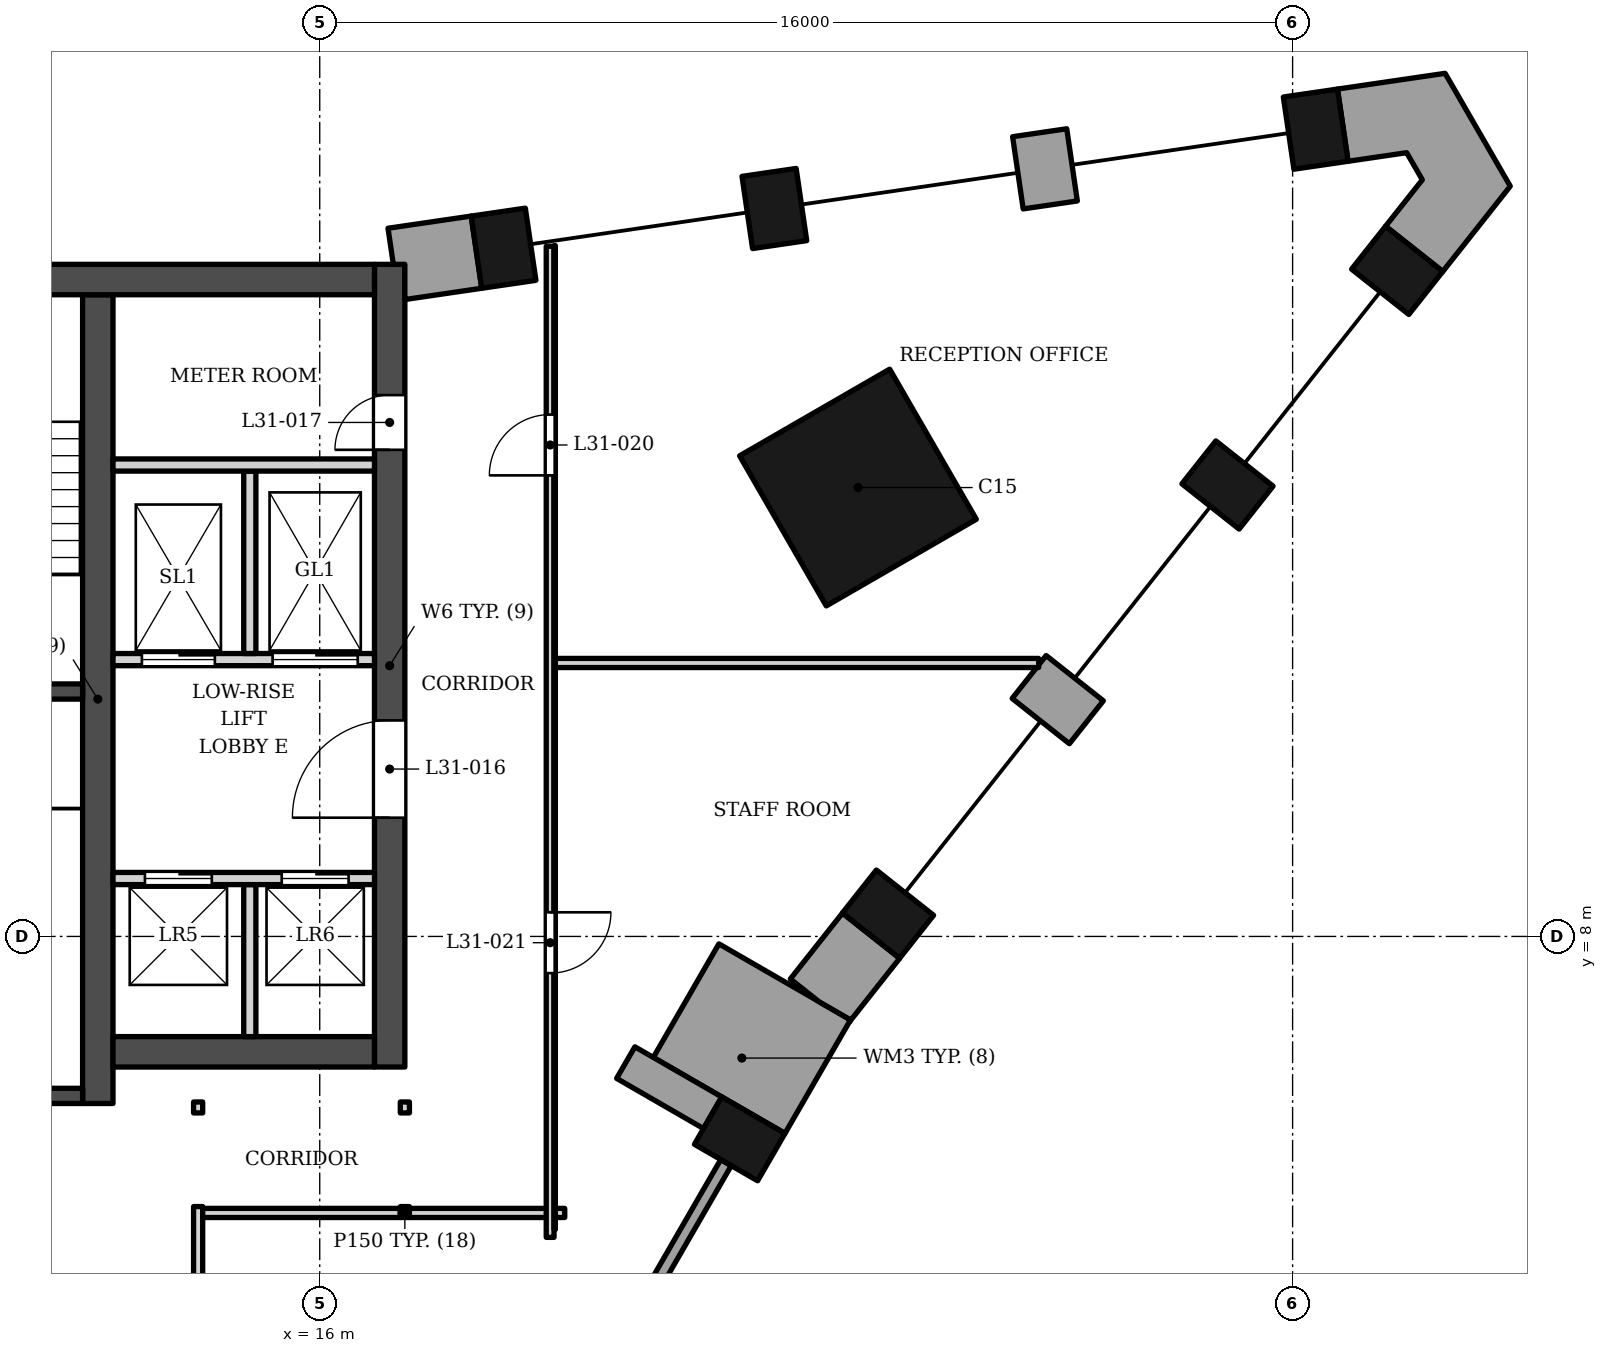
"""IFC4 building model, lengths in metres.
Left out: names, types, materials, properties, quantities, classifications, styles, units other than length and angle.
Written with IfcOpenShell. Run it as: python <this file> out.ifc"""

import sys

from ifc_helpers import new_model, si_unit, direction, frame, frame_2d, origin, origin_2d, place, context, subcontext, project, spatial, polyline, rectangle, outline, extrude, element, fill, save


model = new_model("IFC4")
c1 = context("Model", 3, precision=1e-05, world=origin(), true_north=direction((0.0, 1.0)))
c2 = subcontext(c1, "Body", "Model", "MODEL_VIEW")
j1 = project(units=[si_unit("LENGTHUNIT", "METRE"), si_unit("PLANEANGLEUNIT", "RADIAN")], contexts=[c1])
p1 = place(None, origin())
s1 = spatial("IfcSite", under=j1, at=p1, CompositionType="ELEMENT")
p2 = place(p1, origin())
s2 = spatial("IfcBuilding", under=s1, at=p2, CompositionType="ELEMENT")
p3 = place(p2, frame((0.0, 0.0, 132.6)))
s3 = spatial("IfcBuildingStorey", under=s2, at=p3, CompositionType="ELEMENT", Elevation=132.6)
p4 = place(p3, frame((-16.9, 18.802, 0.0), z_axis=(0.0, 0.0, 1.0), x_axis=(1.0, 0.0, 0.0)))
e1 = element("IfcWall", 1, at=p4, inside=s3, PredefinedType="SHEAR", context=c2, shape_type="SweptSolid", body=[
    extrude(rectangle(XDim=33.8, YDim=0.5, at=frame_2d((16.9, 0.0))), origin(), (0.0, 0.0, 1.0), 7.0),
])
p5 = place(p3, frame((12.35, 5.253, 0.0), z_axis=(0.0, 0.0, 1.0), x_axis=(0.0, 1.0, 0.0)))
e2 = element("IfcWall", 2, at=p5, inside=s3, PredefinedType="SHEAR", context=c2, shape_type="SweptSolid", body=[
    extrude(rectangle(XDim=13.3, YDim=0.5, at=frame_2d((6.65, 0.0))), origin(), (0.0, 0.0, 1.0), 7.0),
])
for number, where, z_axis, x_axis in (
    (3, (8.35, 12.028, 0.0), (0.0, 0.0, 1.0), (1.0, 0.0, 0.0)),
    (4, (8.35, 5.378, 0.0), (0.0, 0.0, 1.0), (1.0, 0.0, 0.0)),
):
    element("IfcWall", number, at=place(p3, frame(where, z_axis=z_axis, x_axis=x_axis)), inside=s3, PredefinedType="SHEAR", context=c2, shape_type="SweptSolid", body=[
        extrude(rectangle(XDim=3.75, YDim=0.25, at=frame_2d((1.875, 0.0))), origin(), (0.0, 0.0, 1.0), 7.0),
    ])
p6 = place(p3, frame((12.6, 6.103, 0.0), z_axis=(0.0, 0.0, 1.0), x_axis=(1.0, 0.0, 0.0)))
e5 = element("IfcWall", 5, at=p6, inside=s3, PredefinedType="SHEAR", context=c2, shape_type="SweptSolid", body=[
    extrude(rectangle(XDim=4.3, YDim=0.5, at=frame_2d((2.15, 0.0))), origin(), (0.0, 0.0, 1.0), 7.0),
])
p7 = place(p3, frame((17.15, 5.853, 0.0), z_axis=(0.0, 0.0, 1.0), x_axis=(0.0, 1.0, 0.0)))
e6 = element("IfcWall", 6, at=p7, inside=s3, PredefinedType="SHEAR", context=c2, shape_type="SweptSolid", body=[
    extrude(rectangle(XDim=13.2, YDim=0.5, at=frame_2d((6.6, 0.0))), origin(), (0.0, 0.0, 1.0), 7.0),
])
p8 = place(p7, frame((4.1, 0.0, 0.0)))
e7 = element("IfcOpeningElement", 7, at=p8, cuts=e6, PredefinedType="OPENING", context=c2, shape_type="SweptSolid", body=[
    extrude(rectangle(XDim=1.6, YDim=2.1, at=frame_2d((0.8, 1.05))), frame((0.0, 0.26, 0.0), z_axis=(0.0, -1.0, 0.0), x_axis=(1.0, 0.0, 0.0)), (0.0, 0.0, 1.0), 0.52),
])
p9 = place(p7, frame((10.15, 0.0, 0.0)))
e8 = element("IfcOpeningElement", 8, at=p9, cuts=e6, PredefinedType="OPENING", context=c2, shape_type="SweptSolid", body=[
    extrude(rectangle(XDim=0.9, YDim=2.1, at=frame_2d((0.45, 1.05))), frame((0.0, 0.26, 0.0), z_axis=(0.0, -1.0, 0.0), x_axis=(1.0, 0.0, 0.0)), (0.0, 0.0, 1.0), 0.52),
])
p10 = place(p3, frame((24.852, 15.382, 0.0), z_axis=(0.0, 0.0, 1.0), x_axis=(-0.866025403784, -0.5, 0.0)))
e9 = element("IfcColumn", 9, at=p10, inside=s3, PredefinedType="COLUMN", context=c2, shape_type="SweptSolid", body=[
    extrude(rectangle(XDim=2.85, YDim=2.85, at=origin_2d()), origin(), (0.0, 0.0, 1.0), 7.0),
])
for number, where, z_axis, x_axis in (
    (10, (22.907, 4.671, 0.0), (0.0, 0.0, 1.0), (0.5, 0.866, 0.0)),
    (11, (25.346, 8.367, 0.0), (0.0, 0.0, 1.0), (0.62, 0.784, 0.0)),
    (12, (30.929, 15.424, 0.0), (0.0, 0.0, 1.0), (0.62, 0.784, 0.0)),
    (13, (33.72, 18.954, 0.0), (0.0, 0.0, 1.0), (0.62, 0.784, 0.0)),
    (14, (32.38, 21.276, 0.0), (0.0, 0.0, 1.0), (-0.989, -0.145, 0.0)),
    (15, (23.477, 19.971, 0.0), (0.0, 0.0, 1.0), (-0.989, -0.145, 0.0)),
    (16, (19.023, 19.318, 0.0), (0.0, 0.0, 1.0), (-0.989, -0.145, 0.0)),
):
    element("IfcColumn", number, at=place(p3, frame(where, z_axis=z_axis, x_axis=x_axis)), inside=s3, PredefinedType="COLUMN", context=c2, shape_type="SweptSolid", body=[
        extrude(rectangle(XDim=0.9, YDim=1.2, at=origin_2d()), origin(), (0.0, 0.0, 1.0), 7.0),
    ])
p11 = place(p3, frame((21.033, 5.925, 0.0), z_axis=(0.0, 0.0, 1.0), x_axis=(0.866040211805, -0.499974350878, 0.0)))
e17 = element("IfcWall", 17, at=p11, inside=s3, PredefinedType="SOLIDWALL", context=c2, shape_type="SweptSolid", body=[
    extrude(rectangle(XDim=1.65, YDim=0.6, at=frame_2d((0.825, 0.0))), origin(), (0.0, 0.0, 1.0), 5.854),
])
p12 = place(p3, frame((20.882, 1.163, 0.0), z_axis=(0.0, 0.0, 1.0), x_axis=(0.500012057535, 0.866018442252, 0.0)))
e18 = element("IfcWall", 18, at=p12, inside=s3, PredefinedType="SOLIDWALL", context=c2, shape_type="SweptSolid", body=[
    extrude(rectangle(XDim=3.6, YDim=0.2, at=frame_2d((1.8, 0.0))), origin(), (0.0, 0.0, 1.0), 6.0),
])
p13 = place(p3, origin())
e19 = element("IfcWall", 19, at=p13, inside=s3, PredefinedType="SOLIDWALL", context=c2, shape_type="SweptSolid", body=[
    extrude(outline(polyline([(22.565, 7.878), (21.486, 6.01), (22.612, 5.36), (22.612, 5.361), (23.652, 4.761), (24.73, 6.628), (22.565, 7.878)])), origin(), (0.0, 0.0, 1.0), 5.854),
])
p14 = place(p3, frame((28.608, 11.522, 0.0), z_axis=(0.0, 0.0, 1.0), x_axis=(-0.784408686564, 0.620244316736, 0.0)))
e20 = element("IfcWall", 20, at=p14, inside=s3, PredefinedType="SOLIDWALL", context=c2, shape_type="SweptSolid", body=[
    extrude(rectangle(XDim=1.2, YDim=0.9, at=frame_2d((0.6, 0.0))), origin(), (0.0, 0.0, 1.0), 6.0),
])
p15 = place(p3, frame((27.84, 21.217, 0.0), z_axis=(0.0, 0.0, 1.0), x_axis=(0.145066385332, -0.989421924078, 0.0)))
e21 = element("IfcWall", 21, at=p15, inside=s3, PredefinedType="SOLIDWALL", context=c2, shape_type="SweptSolid", body=[
    extrude(rectangle(XDim=1.2, YDim=0.9, at=frame_2d((0.6, 0.0))), origin(), (0.0, 0.0, 1.0), 6.0),
])
p16 = place(p3, origin())
e22 = element("IfcWall", 22, at=p16, inside=s3, PredefinedType="SOLIDWALL", context=c2, shape_type="SweptSolid", body=[
    extrude(outline(polyline([(24.597, 8.384), (23.74, 7.3), (24.21, 6.928), (24.73, 6.628), (24.708, 6.59), (25.538, 7.64), (24.597, 8.384)])), origin(), (0.0, 0.0, 1.0), 6.0),
])
p17 = place(p3, origin())
e23 = element("IfcWall", 23, at=p17, inside=s3, PredefinedType="SOLIDWALL", context=c2, shape_type="SweptSolid", body=[
    extrude(outline(polyline([(34.133, 20.443), (33.529, 19.679), (34.47, 18.935), (35.58, 20.338), (34.508, 22.194), (32.738, 21.935), (32.912, 20.748), (33.876, 20.889), (34.133, 20.443)])), origin(), (0.0, 0.0, 1.0), 6.0),
])
p18 = place(p3, origin())
e24 = element("IfcWall", 24, at=p18, inside=s3, PredefinedType="SOLIDWALL", context=c2, shape_type="SweptSolid", body=[
    extrude(outline(polyline([(17.123, 19.646), (17.21, 19.052), (17.4, 19.052), (17.4, 18.474), (18.664, 18.659), (18.49, 19.847), (17.123, 19.646)])), origin(), (0.0, 0.0, 1.0), 6.0),
])
p19 = place(p3, frame((14.85, 6.353, 0.0), z_axis=(0.0, 0.0, 1.0), x_axis=(0.0, 1.0, 0.0)))
e25 = element("IfcWall", 25, at=p19, inside=s3, PredefinedType="SOLIDWALL", context=c2, shape_type="SweptSolid", body=[
    extrude(rectangle(XDim=2.5, YDim=0.2, at=frame_2d((1.25, 0.0))), origin(), (0.0, 0.0, 1.0), 6.7),
])
p20 = place(p3, frame((12.6, 8.953, 0.0), z_axis=(0.0, 0.0, 1.0), x_axis=(1.0, 0.0, 0.0)))
e26 = element("IfcWall", 26, at=p20, inside=s3, PredefinedType="SOLIDWALL", context=c2, shape_type="SweptSolid", body=[
    extrude(rectangle(XDim=4.3, YDim=0.2, at=frame_2d((2.15, 0.0))), origin(), (0.0, 0.0, 1.0), 6.7),
])
p21 = place(p20, frame((0.525, 0.0, 0.0)))
e27 = element("IfcOpeningElement", 27, at=p21, cuts=e26, PredefinedType="OPENING", context=c2, shape_type="SweptSolid", body=[
    extrude(rectangle(XDim=1.1, YDim=2.1, at=frame_2d((0.55, 1.05))), frame((0.0, 0.11, 0.0), z_axis=(0.0, -1.0, 0.0), x_axis=(1.0, 0.0, 0.0)), (0.0, 0.0, 1.0), 0.22),
])
p22 = place(p20, frame((2.775, 0.0, 0.0)))
e28 = element("IfcOpeningElement", 28, at=p22, cuts=e26, PredefinedType="OPENING", context=c2, shape_type="SweptSolid", body=[
    extrude(rectangle(XDim=1.1, YDim=2.1, at=frame_2d((0.55, 1.05))), frame((0.0, 0.11, 0.0), z_axis=(0.0, -1.0, 0.0), x_axis=(1.0, 0.0, 0.0)), (0.0, 0.0, 1.0), 0.22),
])
p23 = place(p3, frame((12.6, 12.552, 0.0), z_axis=(0.0, 0.0, 1.0), x_axis=(1.0, 0.0, 0.0)))
e29 = element("IfcWall", 29, at=p23, inside=s3, PredefinedType="SOLIDWALL", context=c2, shape_type="SweptSolid", body=[
    extrude(rectangle(XDim=4.3, YDim=0.2, at=frame_2d((2.15, 0.0))), origin(), (0.0, 0.0, 1.0), 6.7),
])
p24 = place(p23, frame((0.475, 0.0, 0.0)))
e30 = element("IfcOpeningElement", 30, at=p24, cuts=e29, PredefinedType="OPENING", context=c2, shape_type="SweptSolid", body=[
    extrude(rectangle(XDim=1.2, YDim=2.1, at=frame_2d((0.6, 1.05))), frame((0.0, 0.11, 0.0), z_axis=(0.0, -1.0, 0.0), x_axis=(1.0, 0.0, 0.0)), (0.0, 0.0, 1.0), 0.22),
])
p25 = place(p23, frame((2.625, 0.0, 0.0)))
e31 = element("IfcOpeningElement", 31, at=p25, cuts=e29, PredefinedType="OPENING", context=c2, shape_type="SweptSolid", body=[
    extrude(rectangle(XDim=1.4, YDim=2.1, at=frame_2d((0.7, 1.05))), frame((0.0, 0.11, 0.0), z_axis=(0.0, -1.0, 0.0), x_axis=(1.0, 0.0, 0.0)), (0.0, 0.0, 1.0), 0.22),
])
p26 = place(p3, frame((14.85, 12.653, 0.0), z_axis=(0.0, 0.0, 1.0), x_axis=(0.0, 1.0, 0.0)))
e32 = element("IfcWall", 32, at=p26, inside=s3, PredefinedType="SOLIDWALL", context=c2, shape_type="SweptSolid", body=[
    extrude(rectangle(XDim=3.0, YDim=0.2, at=frame_2d((1.5, 0.0))), origin(), (0.0, 0.0, 1.0), 6.7),
])
p27 = place(p3, frame((12.6, 15.753, 0.0), z_axis=(0.0, 0.0, 1.0), x_axis=(1.0, 0.0, 0.0)))
e33 = element("IfcWall", 33, at=p27, inside=s3, PredefinedType="SOLIDWALL", context=c2, shape_type="SweptSolid", body=[
    extrude(rectangle(XDim=4.3, YDim=0.2, at=frame_2d((2.15, 0.0))), origin(), (0.0, 0.0, 1.0), 6.7),
])
p28 = place(p3, frame((14.0, -6.976, 0.0), z_axis=(0.0, 0.0, 1.0), x_axis=(0.0, 1.0, 0.0)))
e34 = element("IfcWall", 34, at=p28, inside=s3, PredefinedType="PARTITIONING", context=c2, shape_type="SweptSolid", body=[
    extrude(rectangle(XDim=10.534, YDim=0.15, at=frame_2d((5.267, 0.0))), origin(), (0.0, 0.0, 1.0), 6.7),
])
p29 = place(p3, frame((14.075, 3.453, 0.0), z_axis=(0.0, 0.0, 1.0), x_axis=(1.0, 0.0, 0.0)))
e35 = element("IfcWall", 35, at=p29, inside=s3, PredefinedType="PARTITIONING", context=c2, shape_type="SweptSolid", body=[
    extrude(rectangle(XDim=3.25, YDim=0.15, at=frame_2d((1.625, 0.0))), origin(), (0.0, 0.0, 1.0), 6.7),
])
p30 = place(p3, frame((17.4, 3.378, 0.0), z_axis=(0.0, 0.0, 1.0), x_axis=(0.0, 1.0, 0.0)))
e36 = element("IfcWall", 36, at=p30, inside=s3, PredefinedType="PARTITIONING", context=c2, shape_type="SweptSolid", body=[
    extrude(rectangle(XDim=0.18, YDim=0.15, at=frame_2d((0.09, 0.0))), origin(), (0.0, 0.0, 1.0), 6.7),
])
p31 = place(p3, frame((17.475, 3.453, 0.0), z_axis=(0.0, 0.0, 1.0), x_axis=(1.0, 0.0, 0.0)))
e37 = element("IfcWall", 37, at=p31, inside=s3, PredefinedType="PARTITIONING", context=c2, shape_type="SweptSolid", body=[
    extrude(rectangle(XDim=2.554, YDim=0.15, at=frame_2d((1.277, 0.0))), origin(), (0.0, 0.0, 1.0), 6.252),
])
p32 = place(p3, frame((19.789, 3.051, 0.0), z_axis=(0.0, 0.0, 1.0), x_axis=(0.0, 1.0, 0.0)))
e38 = element("IfcWall", 38, at=p32, inside=s3, PredefinedType="PARTITIONING", context=c2, shape_type="SweptSolid", body=[
    extrude(rectangle(XDim=16.298, YDim=0.129, at=frame_2d((8.149, 0.0))), origin(), (0.0, 0.0, 1.0), 5.92),
])
p33 = place(p32, frame((12.531, 0.0, 0.0)))
e39 = element("IfcOpeningElement", 39, at=p33, cuts=e38, PredefinedType="OPENING", context=c2, shape_type="SweptSolid", body=[
    extrude(rectangle(XDim=1.0, YDim=2.1, at=frame_2d((0.5, 1.05))), frame((0.0, 0.074, 0.0), z_axis=(0.0, -1.0, 0.0), x_axis=(1.0, 0.0, 0.0)), (0.0, 0.0, 1.0), 0.149),
])
p34 = place(p32, frame((4.346, 0.0, 0.0)))
e40 = element("IfcOpeningElement", 40, at=p34, cuts=e38, PredefinedType="OPENING", context=c2, shape_type="SweptSolid", body=[
    extrude(rectangle(XDim=1.0, YDim=2.1, at=frame_2d((0.5, 1.05))), frame((0.0, 0.074, 0.0), z_axis=(0.0, -1.0, 0.0), x_axis=(1.0, 0.0, 0.0)), (0.0, 0.0, 1.0), 0.149),
])
p35 = place(p3, frame((19.864, 3.181, 0.0), z_axis=(0.0, 0.0, 1.0), x_axis=(0.0, 1.0, 0.0)))
e41 = element("IfcWall", 41, at=p35, inside=s3, PredefinedType="PARTITIONING", context=c2, shape_type="SweptSolid", body=[
    extrude(rectangle(XDim=16.179, YDim=0.021, at=frame_2d((8.09, 0.0))), origin(), (0.0, 0.0, 1.0), 5.92),
])
for number, where, z_axis, x_axis in (
    (42, (14.0, 5.098, 0.0), (0.0, 0.0, 1.0), (0.0, 1.0, 0.0)),
    (43, (17.4, 5.098, 0.0), (0.0, 0.0, 1.0), (0.0, 1.0, 0.0)),
):
    element("IfcWall", number, at=place(p3, frame(where, z_axis=z_axis, x_axis=x_axis)), inside=s3, PredefinedType="PARTITIONING", context=c2, shape_type="SweptSolid", body=[
        extrude(rectangle(XDim=0.18, YDim=0.15, at=frame_2d((0.09, 0.0))), origin(), (0.0, 0.0, 1.0), 6.7),
    ])
p36 = place(p3, frame((19.875, 12.497, 0.0), z_axis=(0.0, 0.0, 1.0), x_axis=(1.0, 0.0, 0.0)))
e44 = element("IfcWall", 44, at=p36, inside=s3, PredefinedType="PARTITIONING", context=c2, shape_type="SweptSolid", body=[
    extrude(rectangle(XDim=7.948, YDim=0.15, at=frame_2d((3.974, 0.0))), origin(), (0.0, 0.0, 1.0), 5.854),
])
p37 = place(p21, origin())
e45 = element("IfcDoor", 45, at=p37, inside=s3, OperationType="DOUBLE_DOOR_SLIDING", PredefinedType="DOOR", context=c2, shape_type="SweptSolid", body=[
    extrude(rectangle(XDim=1.1, YDim=2.1, at=frame_2d((0.55, 1.05))), frame((0.0, 0.025, 0.0), z_axis=(0.0, -1.0, 0.0), x_axis=(1.0, 0.0, 0.0)), (0.0, 0.0, 1.0), 0.05),
])
fill(e27, e45)
p38 = place(p22, origin())
e46 = element("IfcDoor", 46, at=p38, inside=s3, OperationType="DOUBLE_DOOR_SLIDING", PredefinedType="DOOR", context=c2, shape_type="SweptSolid", body=[
    extrude(rectangle(XDim=1.1, YDim=2.1, at=frame_2d((0.55, 1.05))), frame((0.0, 0.025, 0.0), z_axis=(0.0, -1.0, 0.0), x_axis=(1.0, 0.0, 0.0)), (0.0, 0.0, 1.0), 0.05),
])
fill(e28, e46)
p39 = place(p24, origin())
e47 = element("IfcDoor", 47, at=p39, inside=s3, OperationType="DOUBLE_DOOR_SLIDING", PredefinedType="DOOR", context=c2, shape_type="SweptSolid", body=[
    extrude(rectangle(XDim=1.2, YDim=2.1, at=frame_2d((0.6, 1.05))), frame((0.0, 0.025, 0.0), z_axis=(0.0, -1.0, 0.0), x_axis=(1.0, 0.0, 0.0)), (0.0, 0.0, 1.0), 0.05),
])
fill(e30, e47)
p40 = place(p25, origin())
e48 = element("IfcDoor", 48, at=p40, inside=s3, OperationType="DOUBLE_DOOR_SLIDING", PredefinedType="DOOR", context=c2, shape_type="SweptSolid", body=[
    extrude(rectangle(XDim=1.4, YDim=2.1, at=frame_2d((0.7, 1.05))), frame((0.0, 0.025, 0.0), z_axis=(0.0, -1.0, 0.0), x_axis=(1.0, 0.0, 0.0)), (0.0, 0.0, 1.0), 0.05),
])
fill(e31, e48)
p41 = place(p8, origin())
e49 = element("IfcDoor", 49, at=p41, inside=s3, OperationType="DOUBLE_DOOR_SINGLE_SWING", PredefinedType="DOOR", context=c2, shape_type="SweptSolid", body=[
    extrude(rectangle(XDim=1.6, YDim=2.1, at=frame_2d((0.8, 1.05))), frame((0.0, 0.025, 0.0), z_axis=(0.0, -1.0, 0.0), x_axis=(1.0, 0.0, 0.0)), (0.0, 0.0, 1.0), 0.05),
])
fill(e7, e49)
p42 = place(p9, origin())
e50 = element("IfcDoor", 50, at=p42, inside=s3, OperationType="SINGLE_SWING_LEFT", PredefinedType="DOOR", context=c2, shape_type="SweptSolid", body=[
    extrude(rectangle(XDim=0.9, YDim=2.1, at=frame_2d((0.45, 1.05))), frame((0.0, 0.025, 0.0), z_axis=(0.0, -1.0, 0.0), x_axis=(1.0, 0.0, 0.0)), (0.0, 0.0, 1.0), 0.05),
])
fill(e8, e50)
p43 = place(p33, origin())
e51 = element("IfcDoor", 51, at=p43, inside=s3, OperationType="SINGLE_SWING_LEFT", PredefinedType="DOOR", context=c2, shape_type="SweptSolid", body=[
    extrude(rectangle(XDim=1.0, YDim=2.1, at=frame_2d((0.5, 1.05))), frame((0.0, 0.025, 0.0), z_axis=(0.0, -1.0, 0.0), x_axis=(1.0, 0.0, 0.0)), (0.0, 0.0, 1.0), 0.05),
])
fill(e39, e51)
p44 = place(p34, origin())
e52 = element("IfcDoor", 52, at=p44, inside=s3, OperationType="SINGLE_SWING_RIGHT", PredefinedType="DOOR", context=c2, shape_type="SweptSolid", body=[
    extrude(rectangle(XDim=1.0, YDim=2.1, at=frame_2d((0.5, 1.05))), frame((0.0, 0.025, 0.0), z_axis=(0.0, -1.0, 0.0), x_axis=(1.0, 0.0, 0.0)), (0.0, 0.0, 1.0), 0.05),
])
fill(e40, e52)
save(model, sys.argv[1])
